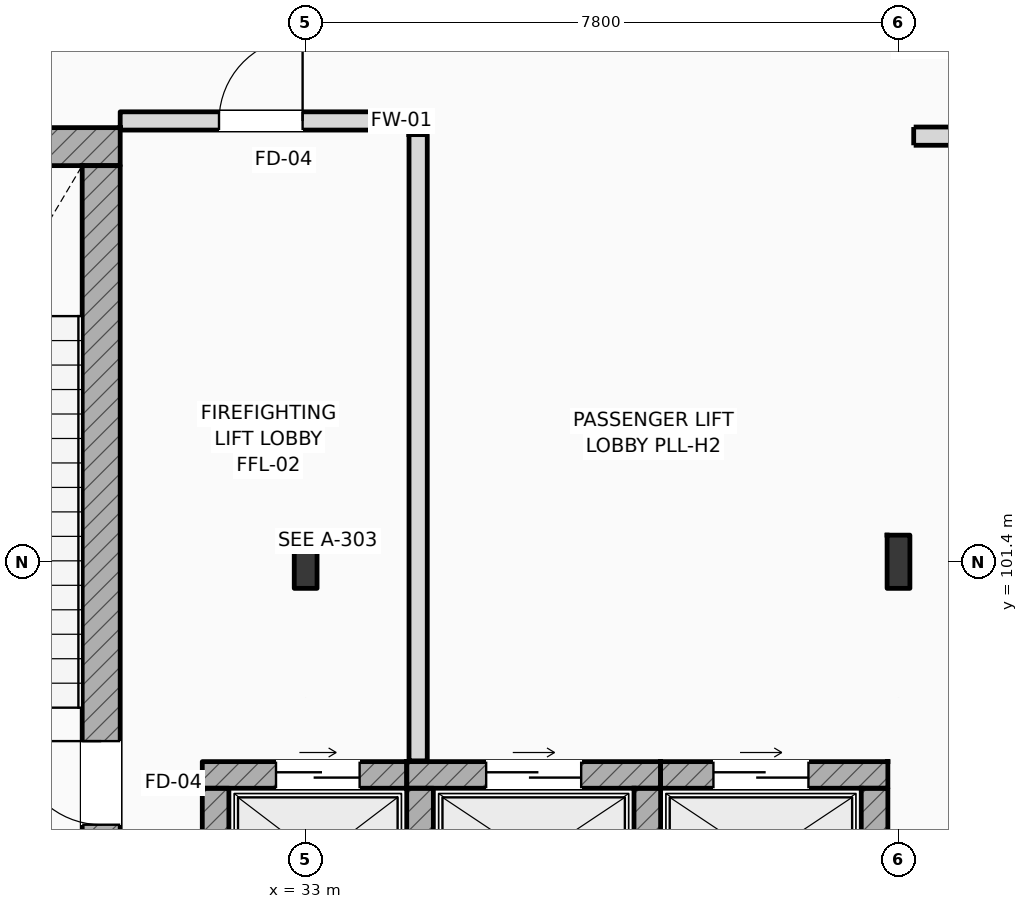
"""IFC4 building model, lengths in metres.
Left out: names, types, materials, properties, quantities, classifications, styles, units other than length and angle.
Written with IfcOpenShell. Run it as: python <this file> out.ifc"""

import sys

from ifc_helpers import new_model, si_unit, direction, frame, frame_2d, origin, origin_2d, place, context, subcontext, project, spatial, rectangle, i_section, extrude, element, fill, save


model = new_model("IFC4")
c1 = context("Model", 3, precision=1e-05, world=origin(), true_north=direction((0.0, 1.0)))
c2 = subcontext(c1, "Body", "Model", "MODEL_VIEW")
j1 = project(units=[si_unit("LENGTHUNIT", "METRE"), si_unit("PLANEANGLEUNIT", "RADIAN")], contexts=[c1])
p1 = place(None, origin())
s1 = spatial("IfcSite", under=j1, at=p1, CompositionType="ELEMENT")
p2 = place(p1, origin())
s2 = spatial("IfcBuilding", under=s1, at=p2, CompositionType="ELEMENT")
p3 = place(p2, origin())
s3 = spatial("IfcBuildingStorey", under=s2, at=p3, CompositionType="ELEMENT", Elevation=0.0)
for number, where, z_axis, x_axis in (
    (1, (33.0, 101.4, 0.0), (0.0, 0.0, 1.0), (1.0, 0.0, 0.0)),
    (2, (40.8, 101.4, 0.0), (0.0, 0.0, 1.0), (1.0, 0.0, 0.0)),
):
    element("IfcColumn", number, at=place(p3, frame(where, z_axis=z_axis, x_axis=x_axis)), inside=s3, PredefinedType="COLUMN", context=c2, shape_type="SweptSolid", body=[
        extrude(i_section(OverallWidth=0.3, OverallDepth=0.7, WebThickness=0.017, FlangeThickness=0.032, FilletRadius=0.027, at=origin_2d()), origin(), (0.0, 0.0, 1.0), 6.0),
    ])
p4 = place(p3, frame((25.4, 106.862, 0.0), z_axis=(0.0, 0.0, 1.0), x_axis=(1.0, 0.0, 0.0)))
e3 = element("IfcWall", 3, at=p4, inside=s3, PredefinedType="SHEAR", context=c2, shape_type="SweptSolid", body=[
    extrude(rectangle(XDim=5.16, YDim=0.5, at=frame_2d((2.58, 0.0))), origin(), (0.0, 0.0, 1.0), 6.0),
])
p5 = place(p3, frame((30.31, 97.5, 0.0), z_axis=(0.0, 0.0, 1.0), x_axis=(0.0, 1.0, 0.0)))
e4 = element("IfcWall", 4, at=p5, inside=s3, PredefinedType="SHEAR", context=c2, shape_type="SweptSolid", body=[
    extrude(rectangle(XDim=9.112, YDim=0.5, at=frame_2d((4.556, 0.0))), origin(), (0.0, 0.0, 1.0), 6.0),
])
p6 = place(p5, frame((0.44, 0.0, 0.0)))
e5 = element("IfcOpeningElement", 5, at=p6, cuts=e4, PredefinedType="OPENING", context=c2, shape_type="SweptSolid", body=[
    extrude(rectangle(XDim=1.1, YDim=2.2, at=frame_2d((0.55, 1.1))), frame((0.0, 0.26, 0.0), z_axis=(0.0, -1.0, 0.0), x_axis=(1.0, 0.0, 0.0)), (0.0, 0.0, 1.0), 0.52),
])
p7 = place(p3, frame((31.64, 98.595, 0.0), z_axis=(0.0, 0.0, 1.0), x_axis=(1.0, 0.0, 0.0)))
e6 = element("IfcWall", 6, at=p7, inside=s3, PredefinedType="SHEAR", context=c2, shape_type="SweptSolid", body=[
    extrude(rectangle(XDim=2.69, YDim=0.35, at=frame_2d((1.345, 0.0))), origin(), (0.0, 0.0, 1.0), 5.7),
])
p8 = place(p7, frame((0.97, 0.0, 0.0)))
e7 = element("IfcOpeningElement", 7, at=p8, cuts=e6, PredefinedType="OPENING", context=c2, shape_type="SweptSolid", body=[
    extrude(rectangle(XDim=1.1, YDim=2.2, at=frame_2d((0.55, 1.1))), frame((0.0, 0.185, 0.0), z_axis=(0.0, -1.0, 0.0), x_axis=(1.0, 0.0, 0.0)), (0.0, 0.0, 1.0), 0.37),
])
p9 = place(p3, frame((31.815, 96.58, 0.0), z_axis=(0.0, 0.0, 1.0), x_axis=(0.0, 1.0, 0.0)))
e8 = element("IfcWall", 8, at=p9, inside=s3, PredefinedType="SHEAR", context=c2, shape_type="SweptSolid", body=[
    extrude(rectangle(XDim=1.84, YDim=0.35, at=frame_2d((0.92, 0.0))), origin(), (0.0, 0.0, 1.0), 5.7),
])
p10 = place(p3, frame((34.33, 98.595, 0.0), z_axis=(0.0, 0.0, 1.0), x_axis=(1.0, 0.0, 0.0)))
e9 = element("IfcWall", 9, at=p10, inside=s3, PredefinedType="SHEAR", context=c2, shape_type="SweptSolid", body=[
    extrude(rectangle(XDim=3.34, YDim=0.35, at=frame_2d((1.67, 0.0))), origin(), (0.0, 0.0, 1.0), 5.7),
])
p11 = place(p10, frame((1.045, 0.0, 0.0)))
e10 = element("IfcOpeningElement", 10, at=p11, cuts=e9, PredefinedType="OPENING", context=c2, shape_type="SweptSolid", body=[
    extrude(rectangle(XDim=1.25, YDim=2.25, at=frame_2d((0.625, 1.125))), frame((0.0, 0.185, 0.0), z_axis=(0.0, -1.0, 0.0), x_axis=(1.0, 0.0, 0.0)), (0.0, 0.0, 1.0), 0.37),
])
for number, where, z_axis, x_axis in (
    (11, (34.505, 96.58, 0.0), (0.0, 0.0, 1.0), (0.0, 1.0, 0.0)),
    (12, (37.495, 96.58, 0.0), (0.0, 0.0, 1.0), (0.0, 1.0, 0.0)),
):
    element("IfcWall", number, at=place(p3, frame(where, z_axis=z_axis, x_axis=x_axis)), inside=s3, PredefinedType="SHEAR", context=c2, shape_type="SweptSolid", body=[
        extrude(rectangle(XDim=1.84, YDim=0.35, at=frame_2d((0.92, 0.0))), origin(), (0.0, 0.0, 1.0), 5.7),
    ])
p12 = place(p3, frame((37.67, 98.595, 0.0), z_axis=(0.0, 0.0, 1.0), x_axis=(1.0, 0.0, 0.0)))
e13 = element("IfcWall", 13, at=p12, inside=s3, PredefinedType="SHEAR", context=c2, shape_type="SweptSolid", body=[
    extrude(rectangle(XDim=2.99, YDim=0.35, at=frame_2d((1.495, 0.0))), origin(), (0.0, 0.0, 1.0), 5.7),
])
p13 = place(p12, frame((0.695, 0.0, 0.0)))
e14 = element("IfcOpeningElement", 14, at=p13, cuts=e13, PredefinedType="OPENING", context=c2, shape_type="SweptSolid", body=[
    extrude(rectangle(XDim=1.25, YDim=2.25, at=frame_2d((0.625, 1.125))), frame((0.0, 0.185, 0.0), z_axis=(0.0, -1.0, 0.0), x_axis=(1.0, 0.0, 0.0)), (0.0, 0.0, 1.0), 0.37),
])
p14 = place(p3, frame((40.485, 96.58, 0.0), z_axis=(0.0, 0.0, 1.0), x_axis=(0.0, 1.0, 0.0)))
e15 = element("IfcWall", 15, at=p14, inside=s3, PredefinedType="SHEAR", context=c2, shape_type="SweptSolid", body=[
    extrude(rectangle(XDim=1.84, YDim=0.35, at=frame_2d((0.92, 0.0))), origin(), (0.0, 0.0, 1.0), 5.24),
])
p15 = place(p3, frame((34.48, 98.78, 0.0), z_axis=(0.0, 0.0, 1.0), x_axis=(0.0, 1.0, 0.0)))
e16 = element("IfcWall", 16, at=p15, inside=s3, PredefinedType="STANDARD", context=c2, shape_type="SweptSolid", body=[
    extrude(rectangle(XDim=8.24, YDim=0.24, at=frame_2d((4.12, 0.0))), origin(), (0.0, 0.0, 1.0), 5.7),
])
p16 = place(p3, frame((30.56, 107.2, 0.0), z_axis=(0.0, 0.0, 1.0), x_axis=(1.0, 0.0, 0.0)))
e17 = element("IfcWall", 17, at=p16, inside=s3, PredefinedType="STANDARD", context=c2, shape_type="SweptSolid", body=[
    extrude(rectangle(XDim=4.1, YDim=0.24, at=frame_2d((2.05, 0.0))), origin(), (0.0, 0.0, 1.0), 5.7),
])
p17 = place(p16, frame((1.3, 0.0, 0.0)))
e18 = element("IfcOpeningElement", 18, at=p17, cuts=e17, PredefinedType="OPENING", context=c2, shape_type="SweptSolid", body=[
    extrude(rectangle(XDim=1.1, YDim=2.2, at=frame_2d((0.55, 1.1))), frame((0.0, 0.13, 0.0), z_axis=(0.0, -1.0, 0.0), x_axis=(1.0, 0.0, 0.0)), (0.0, 0.0, 1.0), 0.26),
])
p18 = place(p3, frame((41.0, 107.0, 0.0), z_axis=(0.0, 0.0, 1.0), x_axis=(1.0, 0.0, 0.0)))
e19 = element("IfcWall", 19, at=p18, inside=s3, PredefinedType="STANDARD", context=c2, shape_type="SweptSolid", body=[
    extrude(rectangle(XDim=22.95, YDim=0.24, at=frame_2d((11.475, 0.0))), origin(), (0.0, 0.0, 1.0), 5.7),
])
p19 = place(p18, frame((10.475, 0.0, 0.0)))
e20 = element("IfcOpeningElement", 20, at=p19, cuts=e19, PredefinedType="OPENING", context=c2, shape_type="SweptSolid", body=[
    extrude(rectangle(XDim=2.0, YDim=2.35, at=frame_2d((1.0, 1.175))), frame((0.0, 0.13, 0.0), z_axis=(0.0, -1.0, 0.0), x_axis=(1.0, 0.0, 0.0)), (0.0, 0.0, 1.0), 0.26),
])
p20 = place(p6, origin())
e21 = element("IfcDoor", 21, at=p20, inside=s3, OperationType="SINGLE_SWING_RIGHT", PredefinedType="DOOR", context=c2, shape_type="SweptSolid", body=[
    extrude(rectangle(XDim=1.1, YDim=2.2, at=frame_2d((0.55, 1.1))), frame((0.0, 0.025, 0.0), z_axis=(0.0, -1.0, 0.0), x_axis=(1.0, 0.0, 0.0)), (0.0, 0.0, 1.0), 0.05),
])
fill(e5, e21)
p21 = place(p8, origin())
e22 = element("IfcDoor", 22, at=p21, inside=s3, OperationType="SLIDING_TO_LEFT", PredefinedType="DOOR", context=c2, shape_type="SweptSolid", body=[
    extrude(rectangle(XDim=1.1, YDim=2.2, at=frame_2d((0.55, 1.1))), frame((0.0, 0.025, 0.0), z_axis=(0.0, -1.0, 0.0), x_axis=(1.0, 0.0, 0.0)), (0.0, 0.0, 1.0), 0.05),
])
fill(e7, e22)
p22 = place(p11, origin())
e23 = element("IfcDoor", 23, at=p22, inside=s3, OperationType="SLIDING_TO_LEFT", PredefinedType="DOOR", context=c2, shape_type="SweptSolid", body=[
    extrude(rectangle(XDim=1.25, YDim=2.25, at=frame_2d((0.625, 1.125))), frame((0.0, 0.025, 0.0), z_axis=(0.0, -1.0, 0.0), x_axis=(1.0, 0.0, 0.0)), (0.0, 0.0, 1.0), 0.05),
])
fill(e10, e23)
p23 = place(p13, origin())
e24 = element("IfcDoor", 24, at=p23, inside=s3, OperationType="SLIDING_TO_LEFT", PredefinedType="DOOR", context=c2, shape_type="SweptSolid", body=[
    extrude(rectangle(XDim=1.25, YDim=2.25, at=frame_2d((0.625, 1.125))), frame((0.0, 0.025, 0.0), z_axis=(0.0, -1.0, 0.0), x_axis=(1.0, 0.0, 0.0)), (0.0, 0.0, 1.0), 0.05),
])
fill(e14, e24)
p24 = place(p17, origin())
e25 = element("IfcDoor", 25, at=p24, inside=s3, OperationType="SINGLE_SWING_RIGHT", PredefinedType="DOOR", context=c2, shape_type="SweptSolid", body=[
    extrude(rectangle(XDim=1.1, YDim=2.2, at=frame_2d((0.55, 1.1))), frame((0.0, 0.025, 0.0), z_axis=(0.0, -1.0, 0.0), x_axis=(1.0, 0.0, 0.0)), (0.0, 0.0, 1.0), 0.05),
])
fill(e18, e25)
save(model, sys.argv[1])
